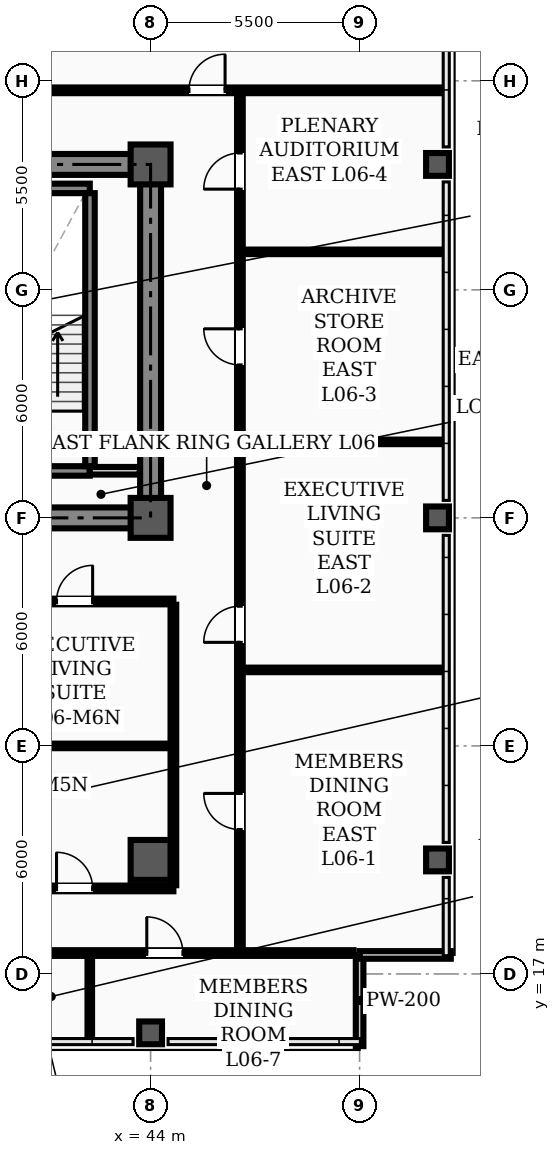
"""IFC4 building model, lengths in metres.
Left out: names, types, materials, properties, quantities, classifications, styles, units other than length and angle.
Written with IfcOpenShell. Run it as: python <this file> out.ifc"""

import sys

from ifc_helpers import new_model, si_unit, direction, frame, frame_2d, origin, origin_2d, place, context, subcontext, project, spatial, rectangle, hollow_rectangle, extrude, element, fill, save


model = new_model("IFC4")
c1 = context("Model", 3, precision=1e-05, world=origin(), true_north=direction((0.0, 1.0)))
c2 = subcontext(c1, "Body", "Model", "MODEL_VIEW")
j1 = project(units=[si_unit("LENGTHUNIT", "METRE"), si_unit("PLANEANGLEUNIT", "RADIAN")], contexts=[c1])
p1 = place(None, origin())
s1 = spatial("IfcSite", under=j1, at=p1, CompositionType="ELEMENT")
p2 = place(p1, origin())
s2 = spatial("IfcBuilding", under=s1, at=p2, CompositionType="ELEMENT")
p3 = place(p2, frame((0.0, 0.0, 26.5)))
s3 = spatial("IfcBuildingStorey", under=s2, at=p3, CompositionType="ELEMENT", Elevation=26.5)
for number, where, z_axis, x_axis in (
    (1, (44.0, 29.0, 0.0), (0.0, 0.0, 1.0), (1.0, 0.0, 0.0)),
    (2, (44.0, 38.3, 0.0), (0.0, 0.0, 1.0), (1.0, 0.0, 0.0)),
    (3, (44.0, 20.0, 0.0), (0.0, 0.0, 1.0), (1.0, 0.0, 0.0)),
):
    element("IfcColumn", number, at=place(p3, frame(where, z_axis=z_axis, x_axis=x_axis)), inside=s3, PredefinedType="COLUMN", context=c2, shape_type="SweptSolid", body=[
        extrude(hollow_rectangle(XDim=1.05, YDim=1.05, WallThickness=0.038, InnerFilletRadius=0.019, OuterFilletRadius=0.057, at=origin_2d()), origin(), (0.0, 0.0, 1.0), 3.9),
    ])
for number, where, z_axis, x_axis in (
    (4, (44.0, 15.45, 0.0), (0.0, 0.0, 1.0), (1.0, 0.0, 0.0)),
    (5, (51.55, 20.0, 0.0), (0.0, 0.0, 1.0), (1.0, 0.0, 0.0)),
    (6, (51.55, 29.0, 0.0), (0.0, 0.0, 1.0), (1.0, 0.0, 0.0)),
    (7, (51.55, 38.3, 0.0), (0.0, 0.0, 1.0), (1.0, 0.0, 0.0)),
):
    element("IfcColumn", number, at=place(p3, frame(where, z_axis=z_axis, x_axis=x_axis)), inside=s3, PredefinedType="COLUMN", context=c2, shape_type="SweptSolid", body=[
        extrude(hollow_rectangle(XDim=0.6, YDim=0.6, WallThickness=0.026, InnerFilletRadius=0.013, OuterFilletRadius=0.039, at=origin_2d()), origin(), (0.0, 0.0, 1.0), 3.9),
    ])
for number, where, z_axis, x_axis in (
    (8, (49.5, 15.1, 0.0), (0.0, 0.0, 1.0), (0.0, 1.0, 0.0)),
    (9, (49.5, 17.5, 0.0), (0.0, 0.0, 1.0), (1.0, 0.0, 0.0)),
):
    element("IfcWall", number, at=place(p3, frame(where, z_axis=z_axis, x_axis=x_axis)), inside=s3, PredefinedType="PARAPET", context=c2, shape_type="SweptSolid", body=[
        extrude(rectangle(XDim=2.4, YDim=0.2, at=frame_2d((1.2, 0.0))), origin(), (0.0, 0.0, 1.0), 1.2),
    ])
p4 = place(p3, frame((13.5, 29.0, 0.0), z_axis=(0.0, 0.0, 1.0), x_axis=(1.0, 0.0, 0.0)))
e10 = element("IfcWall", 10, at=p4, inside=s3, PredefinedType="SHEAR", context=c2, shape_type="SweptSolid", body=[
    extrude(rectangle(XDim=30.5, YDim=0.55, at=frame_2d((15.25, 0.0))), origin(), (0.0, 0.0, 1.0), 3.72),
])
p5 = place(p4, frame((1.75, 0.0, 0.0)))
e11 = element("IfcOpeningElement", 11, at=p5, cuts=e10, PredefinedType="OPENING", context=c2, shape_type="SweptSolid", body=[
    extrude(rectangle(XDim=1.1, YDim=2.08, at=frame_2d((0.55, 1.04))), frame((0.0, 0.285, 0.0), z_axis=(0.0, -1.0, 0.0), x_axis=(1.0, 0.0, 0.0)), (0.0, 0.0, 1.0), 0.57),
])
p6 = place(p4, frame((26.7, 0.0, 0.0)))
e12 = element("IfcOpeningElement", 12, at=p6, cuts=e10, PredefinedType="OPENING", context=c2, shape_type="SweptSolid", body=[
    extrude(rectangle(XDim=1.1, YDim=2.08, at=frame_2d((0.55, 1.04))), frame((0.0, 0.285, 0.0), z_axis=(0.0, -1.0, 0.0), x_axis=(1.0, 0.0, 0.0)), (0.0, 0.0, 1.0), 0.57),
])
p7 = place(p4, frame((6.8, 0.0, 0.0)))
e13 = element("IfcOpeningElement", 13, at=p7, cuts=e10, PredefinedType="OPENING", context=c2, shape_type="SweptSolid", body=[
    extrude(rectangle(XDim=1.1, YDim=2.08, at=frame_2d((0.55, 1.04))), frame((0.0, 0.285, 0.0), z_axis=(0.0, -1.0, 0.0), x_axis=(1.0, 0.0, 0.0)), (0.0, 0.0, 1.0), 0.57),
])
p8 = place(p4, frame((13.2, 0.0, 0.0)))
e14 = element("IfcOpeningElement", 14, at=p8, cuts=e10, PredefinedType="OPENING", context=c2, shape_type="SweptSolid", body=[
    extrude(rectangle(XDim=1.6, YDim=2.08, at=frame_2d((0.8, 1.04))), frame((0.0, 0.285, 0.0), z_axis=(0.0, -1.0, 0.0), x_axis=(1.0, 0.0, 0.0)), (0.0, 0.0, 1.0), 0.57),
])
p9 = place(p4, frame((20.525, 0.0, 0.0)))
e15 = element("IfcOpeningElement", 15, at=p9, cuts=e10, PredefinedType="OPENING", context=c2, shape_type="SweptSolid", body=[
    extrude(rectangle(XDim=0.95, YDim=2.08, at=frame_2d((0.475, 1.04))), frame((0.0, 0.285, 0.0), z_axis=(0.0, -1.0, 0.0), x_axis=(1.0, 0.0, 0.0)), (0.0, 0.0, 1.0), 0.57),
])
p10 = place(p3, frame((13.5, 38.3, 0.0), z_axis=(0.0, 0.0, 1.0), x_axis=(1.0, 0.0, 0.0)))
e16 = element("IfcWall", 16, at=p10, inside=s3, PredefinedType="SHEAR", context=c2, shape_type="SweptSolid", body=[
    extrude(rectangle(XDim=30.5, YDim=0.55, at=frame_2d((15.25, 0.0))), origin(), (0.0, 0.0, 1.0), 3.72),
])
p11 = place(p3, frame((44.0, 29.35, 0.0), z_axis=(0.0, 0.0, 1.0), x_axis=(0.0, 1.0, 0.0)))
e17 = element("IfcWall", 17, at=p11, inside=s3, PredefinedType="SHEAR", context=c2, shape_type="SweptSolid", body=[
    extrude(rectangle(XDim=8.6, YDim=0.55, at=frame_2d((4.3, 0.0))), origin(), (0.0, 0.0, 1.0), 3.72),
])
p12 = place(p3, frame((39.06, 30.235, 0.0), z_axis=(0.0, 0.0, 1.0), x_axis=(1.0, 0.0, 0.0)))
e18 = element("IfcWall", 18, at=p12, inside=s3, PredefinedType="STANDARD", context=c2, shape_type="SweptSolid", body=[
    extrude(rectangle(XDim=3.34, YDim=0.25, at=frame_2d((1.67, 0.0))), origin(), (0.0, 0.0, 1.0), 3.72),
])
p13 = place(p12, frame((1.1, 0.0, 0.0)))
e19 = element("IfcOpeningElement", 19, at=p13, cuts=e18, PredefinedType="OPENING", context=c2, shape_type="SweptSolid", body=[
    extrude(rectangle(XDim=1.1, YDim=2.08, at=frame_2d((0.55, 1.04))), frame((0.0, 0.135, 0.0), z_axis=(0.0, -1.0, 0.0), x_axis=(1.0, 0.0, 0.0)), (0.0, 0.0, 1.0), 0.27),
])
p14 = place(p3, frame((39.06, 37.669, 0.0), z_axis=(0.0, 0.0, 1.0), x_axis=(1.0, 0.0, 0.0)))
e20 = element("IfcWall", 20, at=p14, inside=s3, PredefinedType="STANDARD", context=c2, shape_type="SweptSolid", body=[
    extrude(rectangle(XDim=3.34, YDim=0.25, at=frame_2d((1.67, 0.0))), origin(), (0.0, 0.0, 1.0), 3.72),
])
p15 = place(p3, frame((42.405, 30.36, 0.0), z_axis=(0.0, 0.0, 1.0), x_axis=(0.0, 1.0, 0.0)))
e21 = element("IfcWall", 21, at=p15, inside=s3, PredefinedType="STANDARD", context=c2, shape_type="SweptSolid", body=[
    extrude(rectangle(XDim=7.184, YDim=0.25, at=frame_2d((3.592, 0.0))), origin(), (0.0, 0.0, 1.0), 3.72),
])
p16 = place(p3, frame((42.4, 30.24, 0.0), z_axis=(0.0, 0.0, 1.0), x_axis=(1.0, 0.0, 0.0)))
e22 = element("IfcWall", 22, at=p16, inside=s3, PredefinedType="STANDARD", context=c2, shape_type="SweptSolid", body=[
    extrude(rectangle(XDim=1.315, YDim=0.2, at=frame_2d((0.658, 0.0))), origin(), (0.0, 0.0, 1.0), 3.1),
])
p17 = place(p3, frame((12.9, 26.8, 0.0), z_axis=(0.0, 0.0, 1.0), x_axis=(1.0, 0.0, 0.0)))
e23 = element("IfcWall", 23, at=p17, inside=s3, PredefinedType="PARTITIONING", context=c2, shape_type="SweptSolid", body=[
    extrude(rectangle(XDim=31.7, YDim=0.15, at=frame_2d((15.85, 0.0))), origin(), (0.0, 0.0, 1.0), 3.1),
])
p18 = place(p17, frame((13.6, 0.0, 0.0)))
e24 = element("IfcOpeningElement", 24, at=p18, cuts=e23, PredefinedType="OPENING", context=c2, shape_type="SweptSolid", body=[
    extrude(rectangle(XDim=1.6, YDim=2.08, at=frame_2d((0.8, 1.04))), frame((0.0, 0.085, 0.0), z_axis=(0.0, -1.0, 0.0), x_axis=(1.0, 0.0, 0.0)), (0.0, 0.0, 1.0), 0.17),
])
p19 = place(p17, frame((1.775, 0.0, 0.0)))
e25 = element("IfcOpeningElement", 25, at=p19, cuts=e23, PredefinedType="OPENING", context=c2, shape_type="SweptSolid", body=[
    extrude(rectangle(XDim=0.95, YDim=2.08, at=frame_2d((0.475, 1.04))), frame((0.0, 0.085, 0.0), z_axis=(0.0, -1.0, 0.0), x_axis=(1.0, 0.0, 0.0)), (0.0, 0.0, 1.0), 0.17),
])
p20 = place(p17, frame((6.225, 0.0, 0.0)))
e26 = element("IfcOpeningElement", 26, at=p20, cuts=e23, PredefinedType="OPENING", context=c2, shape_type="SweptSolid", body=[
    extrude(rectangle(XDim=0.95, YDim=2.08, at=frame_2d((0.475, 1.04))), frame((0.0, 0.085, 0.0), z_axis=(0.0, -1.0, 0.0), x_axis=(1.0, 0.0, 0.0)), (0.0, 0.0, 1.0), 0.17),
])
p21 = place(p17, frame((10.625, 0.0, 0.0)))
e27 = element("IfcOpeningElement", 27, at=p21, cuts=e23, PredefinedType="OPENING", context=c2, shape_type="SweptSolid", body=[
    extrude(rectangle(XDim=0.95, YDim=2.08, at=frame_2d((0.475, 1.04))), frame((0.0, 0.085, 0.0), z_axis=(0.0, -1.0, 0.0), x_axis=(1.0, 0.0, 0.0)), (0.0, 0.0, 1.0), 0.17),
])
p22 = place(p17, frame((16.075, 0.0, 0.0)))
e28 = element("IfcOpeningElement", 28, at=p22, cuts=e23, PredefinedType="OPENING", context=c2, shape_type="SweptSolid", body=[
    extrude(rectangle(XDim=0.95, YDim=2.08, at=frame_2d((0.475, 1.04))), frame((0.0, 0.085, 0.0), z_axis=(0.0, -1.0, 0.0), x_axis=(1.0, 0.0, 0.0)), (0.0, 0.0, 1.0), 0.17),
])
p23 = place(p17, frame((21.925, 0.0, 0.0)))
e29 = element("IfcOpeningElement", 29, at=p23, cuts=e23, PredefinedType="OPENING", context=c2, shape_type="SweptSolid", body=[
    extrude(rectangle(XDim=0.95, YDim=2.08, at=frame_2d((0.475, 1.04))), frame((0.0, 0.085, 0.0), z_axis=(0.0, -1.0, 0.0), x_axis=(1.0, 0.0, 0.0)), (0.0, 0.0, 1.0), 0.17),
])
p24 = place(p17, frame((28.625, 0.0, 0.0)))
e30 = element("IfcOpeningElement", 30, at=p24, cuts=e23, PredefinedType="OPENING", context=c2, shape_type="SweptSolid", body=[
    extrude(rectangle(XDim=0.95, YDim=2.08, at=frame_2d((0.475, 1.04))), frame((0.0, 0.085, 0.0), z_axis=(0.0, -1.0, 0.0), x_axis=(1.0, 0.0, 0.0)), (0.0, 0.0, 1.0), 0.17),
])
p25 = place(p3, frame((4.66, 17.55, 0.0), z_axis=(0.0, 0.0, 1.0), x_axis=(1.0, 0.0, 0.0)))
e31 = element("IfcWall", 31, at=p25, inside=s3, PredefinedType="PARTITIONING", context=c2, shape_type="SweptSolid", body=[
    extrude(rectangle(XDim=44.68, YDim=0.15, at=frame_2d((22.34, 0.0))), origin(), (0.0, 0.0, 1.0), 3.1),
])
p26 = place(p25, frame((6.74, 0.0, 0.0)))
e32 = element("IfcOpeningElement", 32, at=p26, cuts=e31, PredefinedType="OPENING", context=c2, shape_type="SweptSolid", body=[
    extrude(rectangle(XDim=0.95, YDim=2.08, at=frame_2d((0.475, 1.04))), frame((0.0, 0.085, 0.0), z_axis=(0.0, -1.0, 0.0), x_axis=(1.0, 0.0, 0.0)), (0.0, 0.0, 1.0), 0.17),
])
p27 = place(p25, frame((13.865, 0.0, 0.0)))
e33 = element("IfcOpeningElement", 33, at=p27, cuts=e31, PredefinedType="OPENING", context=c2, shape_type="SweptSolid", body=[
    extrude(rectangle(XDim=0.95, YDim=2.08, at=frame_2d((0.475, 1.04))), frame((0.0, 0.085, 0.0), z_axis=(0.0, -1.0, 0.0), x_axis=(1.0, 0.0, 0.0)), (0.0, 0.0, 1.0), 0.17),
])
p28 = place(p25, frame((28.765, 0.0, 0.0)))
e34 = element("IfcOpeningElement", 34, at=p28, cuts=e31, PredefinedType="OPENING", context=c2, shape_type="SweptSolid", body=[
    extrude(rectangle(XDim=0.95, YDim=2.08, at=frame_2d((0.475, 1.04))), frame((0.0, 0.085, 0.0), z_axis=(0.0, -1.0, 0.0), x_axis=(1.0, 0.0, 0.0)), (0.0, 0.0, 1.0), 0.17),
])
p29 = place(p25, frame((34.465, 0.0, 0.0)))
e35 = element("IfcOpeningElement", 35, at=p29, cuts=e31, PredefinedType="OPENING", context=c2, shape_type="SweptSolid", body=[
    extrude(rectangle(XDim=0.95, YDim=2.08, at=frame_2d((0.475, 1.04))), frame((0.0, 0.085, 0.0), z_axis=(0.0, -1.0, 0.0), x_axis=(1.0, 0.0, 0.0)), (0.0, 0.0, 1.0), 0.17),
])
p30 = place(p25, frame((39.24, 0.0, 0.0)))
e36 = element("IfcOpeningElement", 36, at=p30, cuts=e31, PredefinedType="OPENING", context=c2, shape_type="SweptSolid", body=[
    extrude(rectangle(XDim=0.95, YDim=2.08, at=frame_2d((0.475, 1.04))), frame((0.0, 0.085, 0.0), z_axis=(0.0, -1.0, 0.0), x_axis=(1.0, 0.0, 0.0)), (0.0, 0.0, 1.0), 0.17),
])
p31 = place(p3, frame((28.4, 19.25, 0.0), z_axis=(0.0, 0.0, 1.0), x_axis=(1.0, 0.0, 0.0)))
e37 = element("IfcWall", 37, at=p31, inside=s3, PredefinedType="PARTITIONING", context=c2, shape_type="SweptSolid", body=[
    extrude(rectangle(XDim=16.2, YDim=0.15, at=frame_2d((8.1, 0.0))), origin(), (0.0, 0.0, 1.0), 3.1),
])
p32 = place(p31, frame((0.575, 0.0, 0.0)))
e38 = element("IfcOpeningElement", 38, at=p32, cuts=e37, PredefinedType="OPENING", context=c2, shape_type="SweptSolid", body=[
    extrude(rectangle(XDim=0.95, YDim=2.08, at=frame_2d((0.475, 1.04))), frame((0.0, 0.085, 0.0), z_axis=(0.0, -1.0, 0.0), x_axis=(1.0, 0.0, 0.0)), (0.0, 0.0, 1.0), 0.17),
])
p33 = place(p31, frame((6.425, 0.0, 0.0)))
e39 = element("IfcOpeningElement", 39, at=p33, cuts=e37, PredefinedType="OPENING", context=c2, shape_type="SweptSolid", body=[
    extrude(rectangle(XDim=0.95, YDim=2.08, at=frame_2d((0.475, 1.04))), frame((0.0, 0.085, 0.0), z_axis=(0.0, -1.0, 0.0), x_axis=(1.0, 0.0, 0.0)), (0.0, 0.0, 1.0), 0.17),
])
p34 = place(p31, frame((13.125, 0.0, 0.0)))
e40 = element("IfcOpeningElement", 40, at=p34, cuts=e37, PredefinedType="OPENING", context=c2, shape_type="SweptSolid", body=[
    extrude(rectangle(XDim=0.95, YDim=2.08, at=frame_2d((0.475, 1.04))), frame((0.0, 0.085, 0.0), z_axis=(0.0, -1.0, 0.0), x_axis=(1.0, 0.0, 0.0)), (0.0, 0.0, 1.0), 0.17),
])
p35 = place(p3, frame((39.4, 23.0, 0.0), z_axis=(0.0, 0.0, 1.0), x_axis=(1.0, 0.0, 0.0)))
e41 = element("IfcWall", 41, at=p35, inside=s3, PredefinedType="PARTITIONING", context=c2, shape_type="SweptSolid", body=[
    extrude(rectangle(XDim=5.2, YDim=0.12, at=frame_2d((2.6, 0.0))), origin(), (0.0, 0.0, 1.0), 3.1),
])
for number, where, z_axis, x_axis in (
    (42, (46.35, 25.0, 0.0), (0.0, 0.0, 1.0), (1.0, 0.0, 0.0)),
    (43, (46.35, 31.0, 0.0), (0.0, 0.0, 1.0), (1.0, 0.0, 0.0)),
    (44, (46.35, 36.0, 0.0), (0.0, 0.0, 1.0), (1.0, 0.0, 0.0)),
):
    element("IfcWall", number, at=place(p3, frame(where, z_axis=z_axis, x_axis=x_axis)), inside=s3, PredefinedType="PARTITIONING", context=c2, shape_type="SweptSolid", body=[
        extrude(rectangle(XDim=5.34, YDim=0.12, at=frame_2d((2.67, 0.0))), origin(), (0.0, 0.0, 1.0), 3.212),
    ])
p36 = place(p3, frame((2.31, 40.25, 0.0), z_axis=(0.0, 0.0, 1.0), x_axis=(1.0, 0.0, 0.0)))
e45 = element("IfcWall", 45, at=p36, inside=s3, PredefinedType="PARTITIONING", context=c2, shape_type="SweptSolid", body=[
    extrude(rectangle(XDim=49.38, YDim=0.15, at=frame_2d((24.69, 0.0))), origin(), (0.0, 0.0, 1.0), 3.1),
])
p37 = place(p36, frame((9.23, 0.0, 0.0)))
e46 = element("IfcOpeningElement", 46, at=p37, cuts=e45, PredefinedType="OPENING", context=c2, shape_type="SweptSolid", body=[
    extrude(rectangle(XDim=0.95, YDim=2.08, at=frame_2d((0.475, 1.04))), frame((0.0, 0.085, 0.0), z_axis=(0.0, -1.0, 0.0), x_axis=(1.0, 0.0, 0.0)), (0.0, 0.0, 1.0), 0.17),
])
p38 = place(p36, frame((18.715, 0.0, 0.0)))
e47 = element("IfcOpeningElement", 47, at=p38, cuts=e45, PredefinedType="OPENING", context=c2, shape_type="SweptSolid", body=[
    extrude(rectangle(XDim=0.95, YDim=2.08, at=frame_2d((0.475, 1.04))), frame((0.0, 0.085, 0.0), z_axis=(0.0, -1.0, 0.0), x_axis=(1.0, 0.0, 0.0)), (0.0, 0.0, 1.0), 0.17),
])
p39 = place(p36, frame((26.715, 0.0, 0.0)))
e48 = element("IfcOpeningElement", 48, at=p39, cuts=e45, PredefinedType="OPENING", context=c2, shape_type="SweptSolid", body=[
    extrude(rectangle(XDim=0.95, YDim=2.08, at=frame_2d((0.475, 1.04))), frame((0.0, 0.085, 0.0), z_axis=(0.0, -1.0, 0.0), x_axis=(1.0, 0.0, 0.0)), (0.0, 0.0, 1.0), 0.17),
])
p40 = place(p36, frame((31.765, 0.0, 0.0)))
e49 = element("IfcOpeningElement", 49, at=p40, cuts=e45, PredefinedType="OPENING", context=c2, shape_type="SweptSolid", body=[
    extrude(rectangle(XDim=0.95, YDim=2.08, at=frame_2d((0.475, 1.04))), frame((0.0, 0.085, 0.0), z_axis=(0.0, -1.0, 0.0), x_axis=(1.0, 0.0, 0.0)), (0.0, 0.0, 1.0), 0.17),
])
p41 = place(p36, frame((42.7, 0.0, 0.0)))
e50 = element("IfcOpeningElement", 50, at=p41, cuts=e45, PredefinedType="OPENING", context=c2, shape_type="SweptSolid", body=[
    extrude(rectangle(XDim=0.95, YDim=2.08, at=frame_2d((0.475, 1.04))), frame((0.0, 0.085, 0.0), z_axis=(0.0, -1.0, 0.0), x_axis=(1.0, 0.0, 0.0)), (0.0, 0.0, 1.0), 0.17),
])
p42 = place(p3, frame((46.35, 17.635, 0.0), z_axis=(0.0, 0.0, 1.0), x_axis=(0.0, 1.0, 0.0)))
e51 = element("IfcWall", 51, at=p42, inside=s3, PredefinedType="PARTITIONING", context=c2, shape_type="SweptSolid", body=[
    extrude(rectangle(XDim=22.53, YDim=0.15, at=frame_2d((11.265, 0.0))), origin(), (0.0, 0.0, 1.0), 3.0),
])
p43 = place(p42, frame((3.165, 0.0, 0.0)))
e52 = element("IfcOpeningElement", 52, at=p43, cuts=e51, PredefinedType="OPENING", context=c2, shape_type="SweptSolid", body=[
    extrude(rectangle(XDim=0.95, YDim=2.08, at=frame_2d((0.475, 1.04))), frame((0.0, 0.085, 0.0), z_axis=(0.0, -1.0, 0.0), x_axis=(1.0, 0.0, 0.0)), (0.0, 0.0, 1.0), 0.17),
])
p44 = place(p42, frame((8.09, 0.0, 0.0)))
e53 = element("IfcOpeningElement", 53, at=p44, cuts=e51, PredefinedType="OPENING", context=c2, shape_type="SweptSolid", body=[
    extrude(rectangle(XDim=0.95, YDim=2.08, at=frame_2d((0.475, 1.04))), frame((0.0, 0.085, 0.0), z_axis=(0.0, -1.0, 0.0), x_axis=(1.0, 0.0, 0.0)), (0.0, 0.0, 1.0), 0.17),
])
p45 = place(p42, frame((15.39, 0.0, 0.0)))
e54 = element("IfcOpeningElement", 54, at=p45, cuts=e51, PredefinedType="OPENING", context=c2, shape_type="SweptSolid", body=[
    extrude(rectangle(XDim=0.95, YDim=2.08, at=frame_2d((0.475, 1.04))), frame((0.0, 0.085, 0.0), z_axis=(0.0, -1.0, 0.0), x_axis=(1.0, 0.0, 0.0)), (0.0, 0.0, 1.0), 0.17),
])
p46 = place(p42, frame((20.015, 0.0, 0.0)))
e55 = element("IfcOpeningElement", 55, at=p46, cuts=e51, PredefinedType="OPENING", context=c2, shape_type="SweptSolid", body=[
    extrude(rectangle(XDim=0.95, YDim=2.08, at=frame_2d((0.475, 1.04))), frame((0.0, 0.085, 0.0), z_axis=(0.0, -1.0, 0.0), x_axis=(1.0, 0.0, 0.0)), (0.0, 0.0, 1.0), 0.17),
])
p47 = place(p3, frame((44.6, 19.335, 0.0), z_axis=(0.0, 0.0, 1.0), x_axis=(0.0, 1.0, 0.0)))
e56 = element("IfcWall", 56, at=p47, inside=s3, PredefinedType="PARTITIONING", context=c2, shape_type="SweptSolid", body=[
    extrude(rectangle(XDim=7.38, YDim=0.15, at=frame_2d((3.69, 0.0))), origin(), (0.0, 0.0, 1.0), 3.0),
])
p48 = place(p3, frame((42.4, 15.31, 0.0), z_axis=(0.0, 0.0, 1.0), x_axis=(0.0, 1.0, 0.0)))
e57 = element("IfcWall", 57, at=p48, inside=s3, PredefinedType="PARTITIONING", context=c2, shape_type="SweptSolid", body=[
    extrude(rectangle(XDim=2.155, YDim=0.12, at=frame_2d((1.078, 0.0))), origin(), (0.0, 0.0, 1.0), 3.212),
])
p49 = place(p30, origin())
e58 = element("IfcDoor", 58, at=p49, inside=s3, OperationType="SINGLE_SWING_LEFT", PredefinedType="DOOR", context=c2, shape_type="SweptSolid", body=[
    extrude(rectangle(XDim=0.95, YDim=2.08, at=frame_2d((0.475, 1.04))), frame((0.0, 0.025, 0.0), z_axis=(0.0, -1.0, 0.0), x_axis=(1.0, 0.0, 0.0)), (0.0, 0.0, 1.0), 0.05),
])
fill(e36, e58)
p50 = place(p24, origin())
e59 = element("IfcDoor", 59, at=p50, inside=s3, OperationType="SINGLE_SWING_RIGHT", PredefinedType="DOOR", context=c2, shape_type="SweptSolid", body=[
    extrude(rectangle(XDim=0.95, YDim=2.08, at=frame_2d((0.475, 1.04))), frame((0.0, 0.025, 0.0), z_axis=(0.0, -1.0, 0.0), x_axis=(1.0, 0.0, 0.0)), (0.0, 0.0, 1.0), 0.05),
])
fill(e30, e59)
p51 = place(p34, origin())
e60 = element("IfcDoor", 60, at=p51, inside=s3, OperationType="SINGLE_SWING_LEFT", PredefinedType="DOOR", context=c2, shape_type="SweptSolid", body=[
    extrude(rectangle(XDim=0.95, YDim=2.08, at=frame_2d((0.475, 1.04))), frame((0.0, 0.025, 0.0), z_axis=(0.0, -1.0, 0.0), x_axis=(1.0, 0.0, 0.0)), (0.0, 0.0, 1.0), 0.05),
])
fill(e40, e60)
p52 = place(p43, origin())
e61 = element("IfcDoor", 61, at=p52, inside=s3, OperationType="SINGLE_SWING_RIGHT", PredefinedType="DOOR", context=c2, shape_type="SweptSolid", body=[
    extrude(rectangle(XDim=0.95, YDim=2.08, at=frame_2d((0.475, 1.04))), frame((0.0, 0.025, 0.0), z_axis=(0.0, -1.0, 0.0), x_axis=(1.0, 0.0, 0.0)), (0.0, 0.0, 1.0), 0.05),
])
fill(e52, e61)
p53 = place(p44, origin())
e62 = element("IfcDoor", 62, at=p53, inside=s3, OperationType="SINGLE_SWING_LEFT", PredefinedType="DOOR", context=c2, shape_type="SweptSolid", body=[
    extrude(rectangle(XDim=0.95, YDim=2.08, at=frame_2d((0.475, 1.04))), frame((0.0, 0.025, 0.0), z_axis=(0.0, -1.0, 0.0), x_axis=(1.0, 0.0, 0.0)), (0.0, 0.0, 1.0), 0.05),
])
fill(e53, e62)
p54 = place(p45, origin())
e63 = element("IfcDoor", 63, at=p54, inside=s3, OperationType="SINGLE_SWING_RIGHT", PredefinedType="DOOR", context=c2, shape_type="SweptSolid", body=[
    extrude(rectangle(XDim=0.95, YDim=2.08, at=frame_2d((0.475, 1.04))), frame((0.0, 0.025, 0.0), z_axis=(0.0, -1.0, 0.0), x_axis=(1.0, 0.0, 0.0)), (0.0, 0.0, 1.0), 0.05),
])
fill(e54, e63)
p55 = place(p46, origin())
e64 = element("IfcDoor", 64, at=p55, inside=s3, OperationType="SINGLE_SWING_LEFT", PredefinedType="DOOR", context=c2, shape_type="SweptSolid", body=[
    extrude(rectangle(XDim=0.95, YDim=2.08, at=frame_2d((0.475, 1.04))), frame((0.0, 0.025, 0.0), z_axis=(0.0, -1.0, 0.0), x_axis=(1.0, 0.0, 0.0)), (0.0, 0.0, 1.0), 0.05),
])
fill(e55, e64)
p56 = place(p41, origin())
e65 = element("IfcDoor", 65, at=p56, inside=s3, OperationType="SINGLE_SWING_RIGHT", PredefinedType="DOOR", context=c2, shape_type="SweptSolid", body=[
    extrude(rectangle(XDim=0.95, YDim=2.08, at=frame_2d((0.475, 1.04))), frame((0.0, 0.025, 0.0), z_axis=(0.0, -1.0, 0.0), x_axis=(1.0, 0.0, 0.0)), (0.0, 0.0, 1.0), 0.05),
])
fill(e50, e65)
save(model, sys.argv[1])
